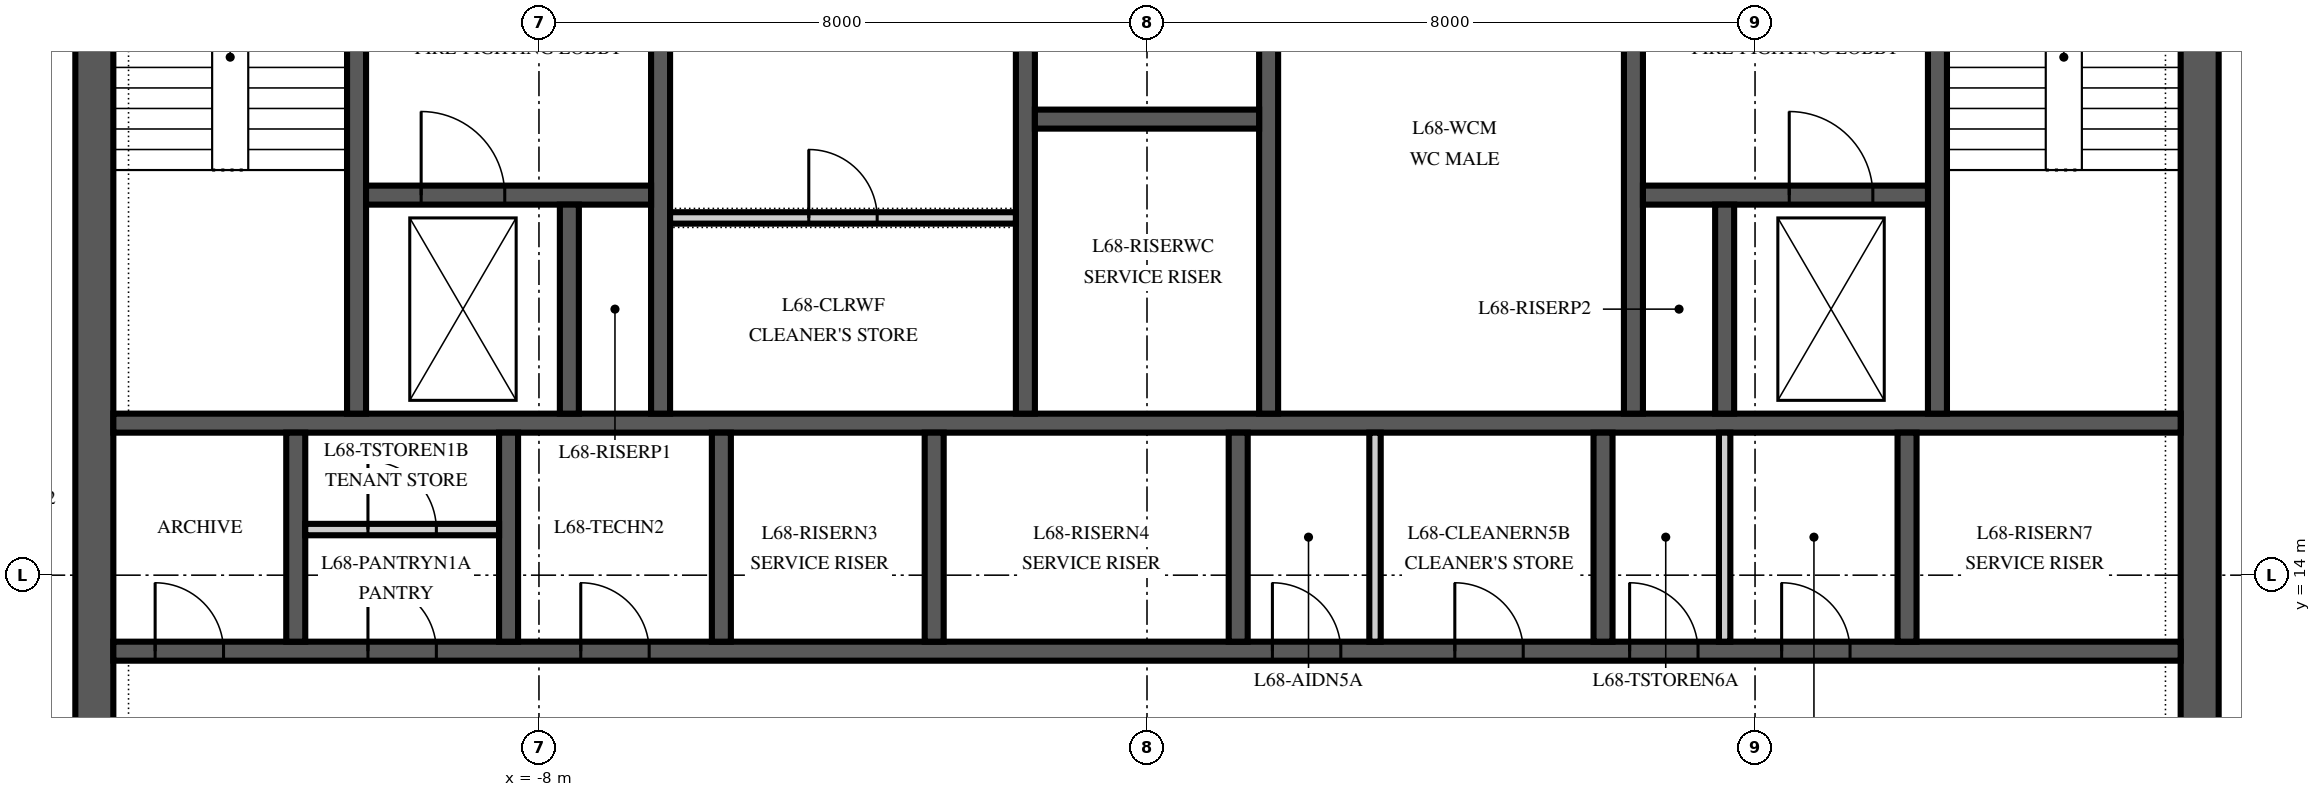
"""IFC4 building model, lengths in metres.
Left out: names, types, materials, properties, quantities, classifications, styles, units other than length and angle.
Written with IfcOpenShell. Run it as: python <this file> out.ifc"""

import sys

from ifc_helpers import new_model, si_unit, direction, frame, frame_2d, origin, place, context, subcontext, project, spatial, polyline, rectangle, outline, extrude, element, fill, save


model = new_model("IFC4")
c1 = context("Model", 3, precision=1e-05, world=origin(), true_north=direction((0.0, 1.0)))
c2 = subcontext(c1, "Body", "Model", "MODEL_VIEW")
j1 = project(units=[si_unit("LENGTHUNIT", "METRE"), si_unit("PLANEANGLEUNIT", "RADIAN")], contexts=[c1])
p1 = place(None, origin())
s1 = spatial("IfcSite", under=j1, at=p1, CompositionType="ELEMENT")
p2 = place(p1, origin())
s2 = spatial("IfcBuilding", under=s1, at=p2, CompositionType="ELEMENT")
p3 = place(p2, frame((0.0, 0.0, 292.0)))
s3 = spatial("IfcBuildingStorey", under=s2, at=p3, CompositionType="ELEMENT", Elevation=292.0)
p4 = place(p3, frame((13.85, 6.15, 0.0), z_axis=(0.0, 0.0, 1.0), x_axis=(0.0, 1.0, 0.0)))
e1 = element("IfcWall", 1, at=p4, inside=s3, PredefinedType="SHEAR", context=c2, shape_type="SweptSolid", body=[
    extrude(outline(polyline([(0.0, -0.25), (17.7, -0.25), (17.7, 0.0), (17.45, 0.0), (17.45, 0.25), (0.25, 0.25), (0.25, 0.0), (0.0, 0.0), (0.0, -0.25)])), origin(), (0.0, 0.0, 1.0), 4.0),
])
p5 = place(p4, frame((4.15, 0.0, 0.0)))
e2 = element("IfcOpeningElement", 2, at=p5, cuts=e1, PredefinedType="OPENING", context=c2, shape_type="SweptSolid", body=[
    extrude(rectangle(XDim=1.8, YDim=2.4, at=frame_2d((0.9, 1.2))), frame((0.0, 0.265, 0.0), z_axis=(0.0, -1.0, 0.0), x_axis=(1.0, 0.0, 0.0)), (0.0, 0.0, 1.0), 0.53),
])
p6 = place(p3, frame((-13.85, 23.85, 0.0), z_axis=(0.0, 0.0, 1.0), x_axis=(0.0, -1.0, 0.0)))
e3 = element("IfcWall", 3, at=p6, inside=s3, PredefinedType="SHEAR", context=c2, shape_type="SweptSolid", body=[
    extrude(outline(polyline([(0.0, -0.25), (17.7, -0.25), (17.7, 0.0), (17.45, 0.0), (17.45, 0.25), (0.25, 0.25), (0.25, 0.0), (0.0, 0.0), (0.0, -0.25)])), origin(), (0.0, 0.0, 1.0), 4.0),
])
p7 = place(p6, frame((11.75, 0.0, 0.0)))
e4 = element("IfcOpeningElement", 4, at=p7, cuts=e3, PredefinedType="OPENING", context=c2, shape_type="SweptSolid", body=[
    extrude(rectangle(XDim=1.8, YDim=2.4, at=frame_2d((0.9, 1.2))), frame((0.0, 0.265, 0.0), z_axis=(0.0, -1.0, 0.0), x_axis=(1.0, 0.0, 0.0)), (0.0, 0.0, 1.0), 0.53),
])
p8 = place(p3, frame((-13.6, 13.0, 0.0), z_axis=(0.0, 0.0, 1.0), x_axis=(1.0, 0.0, 0.0)))
e5 = element("IfcWall", 5, at=p8, inside=s3, PredefinedType="SHEAR", context=c2, shape_type="SweptSolid", body=[
    extrude(rectangle(XDim=27.2, YDim=0.25, at=frame_2d((13.6, 0.0))), origin(), (0.0, 0.0, 1.0), 4.0),
])
p9 = place(p8, frame((15.25, 0.0, 0.0)))
e6 = element("IfcOpeningElement", 6, at=p9, cuts=e5, PredefinedType="OPENING", context=c2, shape_type="SweptSolid", body=[
    extrude(rectangle(XDim=0.9, YDim=2.1, at=frame_2d((0.45, 1.05))), frame((0.0, 0.14, 0.0), z_axis=(0.0, -1.0, 0.0), x_axis=(1.0, 0.0, 0.0)), (0.0, 0.0, 1.0), 0.28),
])
p10 = place(p8, frame((17.65, 0.0, 0.0)))
e7 = element("IfcOpeningElement", 7, at=p10, cuts=e5, PredefinedType="OPENING", context=c2, shape_type="SweptSolid", body=[
    extrude(rectangle(XDim=0.9, YDim=2.1, at=frame_2d((0.45, 1.05))), frame((0.0, 0.14, 0.0), z_axis=(0.0, -1.0, 0.0), x_axis=(1.0, 0.0, 0.0)), (0.0, 0.0, 1.0), 0.28),
])
p11 = place(p8, frame((19.95, 0.0, 0.0)))
e8 = element("IfcOpeningElement", 8, at=p11, cuts=e5, PredefinedType="OPENING", context=c2, shape_type="SweptSolid", body=[
    extrude(rectangle(XDim=0.9, YDim=2.1, at=frame_2d((0.45, 1.05))), frame((0.0, 0.14, 0.0), z_axis=(0.0, -1.0, 0.0), x_axis=(1.0, 0.0, 0.0)), (0.0, 0.0, 1.0), 0.28),
])
p12 = place(p8, frame((21.95, 0.0, 0.0)))
e9 = element("IfcOpeningElement", 9, at=p12, cuts=e5, PredefinedType="OPENING", context=c2, shape_type="SweptSolid", body=[
    extrude(rectangle(XDim=0.9, YDim=2.1, at=frame_2d((0.45, 1.05))), frame((0.0, 0.14, 0.0), z_axis=(0.0, -1.0, 0.0), x_axis=(1.0, 0.0, 0.0)), (0.0, 0.0, 1.0), 0.28),
])
p13 = place(p8, frame((0.55, 0.0, 0.0)))
e10 = element("IfcOpeningElement", 10, at=p13, cuts=e5, PredefinedType="OPENING", context=c2, shape_type="SweptSolid", body=[
    extrude(rectangle(XDim=0.9, YDim=2.1, at=frame_2d((0.45, 1.05))), frame((0.0, 0.14, 0.0), z_axis=(0.0, -1.0, 0.0), x_axis=(1.0, 0.0, 0.0)), (0.0, 0.0, 1.0), 0.28),
])
p14 = place(p8, frame((3.35, 0.0, 0.0)))
e11 = element("IfcOpeningElement", 11, at=p14, cuts=e5, PredefinedType="OPENING", context=c2, shape_type="SweptSolid", body=[
    extrude(rectangle(XDim=0.9, YDim=2.1, at=frame_2d((0.45, 1.05))), frame((0.0, 0.14, 0.0), z_axis=(0.0, -1.0, 0.0), x_axis=(1.0, 0.0, 0.0)), (0.0, 0.0, 1.0), 0.28),
])
p15 = place(p8, frame((6.15, 0.0, 0.0)))
e12 = element("IfcOpeningElement", 12, at=p15, cuts=e5, PredefinedType="OPENING", context=c2, shape_type="SweptSolid", body=[
    extrude(rectangle(XDim=0.9, YDim=2.1, at=frame_2d((0.45, 1.05))), frame((0.0, 0.14, 0.0), z_axis=(0.0, -1.0, 0.0), x_axis=(1.0, 0.0, 0.0)), (0.0, 0.0, 1.0), 0.28),
])
p16 = place(p3, frame((-13.6, 16.0, 0.0), z_axis=(0.0, 0.0, 1.0), x_axis=(1.0, 0.0, 0.0)))
e13 = element("IfcWall", 13, at=p16, inside=s3, PredefinedType="SHEAR", context=c2, shape_type="SweptSolid", body=[
    extrude(rectangle(XDim=27.2, YDim=0.25, at=frame_2d((13.6, 0.0))), origin(), (0.0, 0.0, 1.0), 4.0),
])
for number, where, z_axis, x_axis in (
    (14, (-11.2, 13.125, 0.0), (0.0, 0.0, 1.0), (0.0, 1.0, 0.0)),
    (15, (-8.4, 13.125, 0.0), (0.0, 0.0, 1.0), (0.0, 1.0, 0.0)),
    (16, (-5.6, 13.125, 0.0), (0.0, 0.0, 1.0), (0.0, 1.0, 0.0)),
    (17, (-2.8, 13.125, 0.0), (0.0, 0.0, 1.0), (0.0, 1.0, 0.0)),
    (18, (1.2, 13.125, 0.0), (0.0, 0.0, 1.0), (0.0, 1.0, 0.0)),
    (19, (6.0, 13.125, 0.0), (0.0, 0.0, 1.0), (0.0, 1.0, 0.0)),
    (20, (10.0, 13.125, 0.0), (0.0, 0.0, 1.0), (0.0, 1.0, 0.0)),
):
    element("IfcWall", number, at=place(p3, frame(where, z_axis=z_axis, x_axis=x_axis)), inside=s3, PredefinedType="SHEAR", context=c2, shape_type="SweptSolid", body=[
        extrude(rectangle(XDim=2.75, YDim=0.25, at=frame_2d((1.375, 0.0))), origin(), (0.0, 0.0, 1.0), 4.0),
    ])
p17 = place(p3, frame((-10.4, 16.125, 0.0), z_axis=(0.0, 0.0, 1.0), x_axis=(0.0, 1.0, 0.0)))
e21 = element("IfcWall", 21, at=p17, inside=s3, PredefinedType="SHEAR", context=c2, shape_type="SweptSolid", body=[
    extrude(rectangle(XDim=7.475, YDim=0.25, at=frame_2d((3.738, 0.0))), origin(), (0.0, 0.0, 1.0), 4.0),
])
p18 = place(p17, frame((6.275, 0.0, 0.0)))
e22 = element("IfcOpeningElement", 22, at=p18, cuts=e21, PredefinedType="OPENING", context=c2, shape_type="SweptSolid", body=[
    extrude(rectangle(XDim=1.0, YDim=2.1, at=frame_2d((0.5, 1.05))), frame((0.0, 0.14, 0.0), z_axis=(0.0, -1.0, 0.0), x_axis=(1.0, 0.0, 0.0)), (0.0, 0.0, 1.0), 0.28),
])
for number, where, z_axis, x_axis in (
    (23, (-6.4, 16.125, 0.0), (0.0, 0.0, 1.0), (0.0, 1.0, 0.0)),
    (24, (-1.6, 16.125, 0.0), (0.0, 0.0, 1.0), (0.0, 1.0, 0.0)),
    (25, (1.6, 16.125, 0.0), (0.0, 0.0, 1.0), (0.0, 1.0, 0.0)),
    (26, (6.4, 16.125, 0.0), (0.0, 0.0, 1.0), (0.0, 1.0, 0.0)),
):
    element("IfcWall", number, at=place(p3, frame(where, z_axis=z_axis, x_axis=x_axis)), inside=s3, PredefinedType="SHEAR", context=c2, shape_type="SweptSolid", body=[
        extrude(rectangle(XDim=7.475, YDim=0.25, at=frame_2d((3.738, 0.0))), origin(), (0.0, 0.0, 1.0), 4.0),
    ])
p19 = place(p3, frame((10.4, 16.125, 0.0), z_axis=(0.0, 0.0, 1.0), x_axis=(0.0, 1.0, 0.0)))
e27 = element("IfcWall", 27, at=p19, inside=s3, PredefinedType="SHEAR", context=c2, shape_type="SweptSolid", body=[
    extrude(rectangle(XDim=7.475, YDim=0.25, at=frame_2d((3.738, 0.0))), origin(), (0.0, 0.0, 1.0), 4.0),
])
p20 = place(p19, frame((6.275, 0.0, 0.0)))
e28 = element("IfcOpeningElement", 28, at=p20, cuts=e27, PredefinedType="OPENING", context=c2, shape_type="SweptSolid", body=[
    extrude(rectangle(XDim=1.0, YDim=2.1, at=frame_2d((0.5, 1.05))), frame((0.0, 0.14, 0.0), z_axis=(0.0, -1.0, 0.0), x_axis=(1.0, 0.0, 0.0)), (0.0, 0.0, 1.0), 0.28),
])
p21 = place(p3, frame((-10.275, 19.0, 0.0), z_axis=(0.0, 0.0, 1.0), x_axis=(1.0, 0.0, 0.0)))
e29 = element("IfcWall", 29, at=p21, inside=s3, PredefinedType="SHEAR", context=c2, shape_type="SweptSolid", body=[
    extrude(rectangle(XDim=3.75, YDim=0.25, at=frame_2d((1.875, 0.0))), origin(), (0.0, 0.0, 1.0), 4.0),
])
p22 = place(p21, frame((0.725, 0.0, 0.0)))
e30 = element("IfcOpeningElement", 30, at=p22, cuts=e29, PredefinedType="OPENING", context=c2, shape_type="SweptSolid", body=[
    extrude(rectangle(XDim=1.1, YDim=2.1, at=frame_2d((0.55, 1.05))), frame((0.0, 0.14, 0.0), z_axis=(0.0, -1.0, 0.0), x_axis=(1.0, 0.0, 0.0)), (0.0, 0.0, 1.0), 0.28),
])
p23 = place(p3, frame((6.525, 19.0, 0.0), z_axis=(0.0, 0.0, 1.0), x_axis=(1.0, 0.0, 0.0)))
e31 = element("IfcWall", 31, at=p23, inside=s3, PredefinedType="SHEAR", context=c2, shape_type="SweptSolid", body=[
    extrude(rectangle(XDim=3.75, YDim=0.25, at=frame_2d((1.875, 0.0))), origin(), (0.0, 0.0, 1.0), 4.0),
])
p24 = place(p23, frame((1.925, 0.0, 0.0)))
e32 = element("IfcOpeningElement", 32, at=p24, cuts=e31, PredefinedType="OPENING", context=c2, shape_type="SweptSolid", body=[
    extrude(rectangle(XDim=1.1, YDim=2.1, at=frame_2d((0.55, 1.05))), frame((0.0, 0.14, 0.0), z_axis=(0.0, -1.0, 0.0), x_axis=(1.0, 0.0, 0.0)), (0.0, 0.0, 1.0), 0.28),
])
for number, where, z_axis, x_axis in (
    (33, (-7.6, 16.125, 0.0), (0.0, 0.0, 1.0), (0.0, 1.0, 0.0)),
    (34, (7.6, 16.125, 0.0), (0.0, 0.0, 1.0), (0.0, 1.0, 0.0)),
):
    element("IfcWall", number, at=place(p3, frame(where, z_axis=z_axis, x_axis=x_axis)), inside=s3, PredefinedType="SHEAR", context=c2, shape_type="SweptSolid", body=[
        extrude(rectangle(XDim=2.75, YDim=0.25, at=frame_2d((1.375, 0.0))), origin(), (0.0, 0.0, 1.0), 4.0),
    ])
p25 = place(p3, frame((-1.475, 20.0, 0.0), z_axis=(0.0, 0.0, 1.0), x_axis=(1.0, 0.0, 0.0)))
e35 = element("IfcWall", 35, at=p25, inside=s3, PredefinedType="SHEAR", context=c2, shape_type="SweptSolid", body=[
    extrude(rectangle(XDim=2.95, YDim=0.25, at=frame_2d((1.475, 0.0))), origin(), (0.0, 0.0, 1.0), 4.0),
])
p26 = place(p3, frame((-6.275, 18.7, 0.0), z_axis=(0.0, 0.0, 1.0), x_axis=(1.0, 0.0, 0.0)))
e36 = element("IfcWall", 36, at=p26, inside=s3, PredefinedType="PARTITIONING", context=c2, shape_type="SweptSolid", body=[
    extrude(rectangle(XDim=4.55, YDim=0.15, at=frame_2d((2.275, 0.0))), origin(), (0.0, 0.0, 1.0), 3.85),
])
p27 = place(p26, frame((1.825, 0.0, 0.0)))
e37 = element("IfcOpeningElement", 37, at=p27, cuts=e36, PredefinedType="OPENING", context=c2, shape_type="SweptSolid", body=[
    extrude(rectangle(XDim=0.9, YDim=2.1, at=frame_2d((0.45, 1.05))), frame((0.0, 0.09, 0.0), z_axis=(0.0, -1.0, 0.0), x_axis=(1.0, 0.0, 0.0)), (0.0, 0.0, 1.0), 0.18),
])
for number, where, z_axis, x_axis in (
    (38, (3.0, 13.125, 0.0), (0.0, 0.0, 1.0), (0.0, 1.0, 0.0)),
    (39, (7.6, 13.125, 0.0), (0.0, 0.0, 1.0), (0.0, 1.0, 0.0)),
):
    element("IfcWall", number, at=place(p3, frame(where, z_axis=z_axis, x_axis=x_axis)), inside=s3, PredefinedType="PARTITIONING", context=c2, shape_type="SweptSolid", body=[
        extrude(rectangle(XDim=2.75, YDim=0.15, at=frame_2d((1.375, 0.0))), origin(), (0.0, 0.0, 1.0), 3.85),
    ])
p28 = place(p3, frame((-11.075, 14.6, 0.0), z_axis=(0.0, 0.0, 1.0), x_axis=(1.0, 0.0, 0.0)))
e40 = element("IfcWall", 40, at=p28, inside=s3, PredefinedType="PARTITIONING", context=c2, shape_type="SweptSolid", body=[
    extrude(rectangle(XDim=2.55, YDim=0.15, at=frame_2d((1.275, 0.0))), origin(), (0.0, 0.0, 1.0), 3.85),
])
p29 = place(p28, frame((0.825, 0.0, 0.0)))
e41 = element("IfcOpeningElement", 41, at=p29, cuts=e40, PredefinedType="OPENING", context=c2, shape_type="SweptSolid", body=[
    extrude(rectangle(XDim=0.9, YDim=2.1, at=frame_2d((0.45, 1.05))), frame((0.0, 0.09, 0.0), z_axis=(0.0, -1.0, 0.0), x_axis=(1.0, 0.0, 0.0)), (0.0, 0.0, 1.0), 0.18),
])
p30 = place(p24, origin())
e42 = element("IfcDoor", 42, at=p30, inside=s3, OperationType="SLIDING_TO_RIGHT", PredefinedType="DOOR", context=c2, shape_type="SweptSolid", body=[
    extrude(rectangle(XDim=1.1, YDim=2.1, at=frame_2d((0.55, 1.05))), frame((0.0, 0.125, 0.0), z_axis=(0.0, -1.0, 0.0), x_axis=(1.0, 0.0, 0.0)), (0.0, 0.0, 1.0), 0.25),
])
fill(e32, e42)
p31 = place(p22, origin())
e43 = element("IfcDoor", 43, at=p31, inside=s3, OperationType="SLIDING_TO_RIGHT", PredefinedType="DOOR", context=c2, shape_type="SweptSolid", body=[
    extrude(rectangle(XDim=1.1, YDim=2.1, at=frame_2d((0.55, 1.05))), frame((0.0, 0.125, 0.0), z_axis=(0.0, -1.0, 0.0), x_axis=(1.0, 0.0, 0.0)), (0.0, 0.0, 1.0), 0.25),
])
fill(e30, e43)
p32 = place(p9, origin())
e44 = element("IfcDoor", 44, at=p32, inside=s3, OperationType="SINGLE_SWING_LEFT", PredefinedType="DOOR", context=c2, shape_type="SweptSolid", body=[
    extrude(rectangle(XDim=0.9, YDim=2.1, at=frame_2d((0.45, 1.05))), frame((0.0, 0.125, 0.0), z_axis=(0.0, -1.0, 0.0), x_axis=(1.0, 0.0, 0.0)), (0.0, 0.0, 1.0), 0.25),
])
fill(e6, e44)
p33 = place(p10, origin())
e45 = element("IfcDoor", 45, at=p33, inside=s3, OperationType="SINGLE_SWING_LEFT", PredefinedType="DOOR", context=c2, shape_type="SweptSolid", body=[
    extrude(rectangle(XDim=0.9, YDim=2.1, at=frame_2d((0.45, 1.05))), frame((0.0, 0.125, 0.0), z_axis=(0.0, -1.0, 0.0), x_axis=(1.0, 0.0, 0.0)), (0.0, 0.0, 1.0), 0.25),
])
fill(e7, e45)
p34 = place(p11, origin())
e46 = element("IfcDoor", 46, at=p34, inside=s3, OperationType="SINGLE_SWING_LEFT", PredefinedType="DOOR", context=c2, shape_type="SweptSolid", body=[
    extrude(rectangle(XDim=0.9, YDim=2.1, at=frame_2d((0.45, 1.05))), frame((0.0, 0.125, 0.0), z_axis=(0.0, -1.0, 0.0), x_axis=(1.0, 0.0, 0.0)), (0.0, 0.0, 1.0), 0.25),
])
fill(e8, e46)
p35 = place(p12, origin())
e47 = element("IfcDoor", 47, at=p35, inside=s3, OperationType="SINGLE_SWING_LEFT", PredefinedType="DOOR", context=c2, shape_type="SweptSolid", body=[
    extrude(rectangle(XDim=0.9, YDim=2.1, at=frame_2d((0.45, 1.05))), frame((0.0, 0.125, 0.0), z_axis=(0.0, -1.0, 0.0), x_axis=(1.0, 0.0, 0.0)), (0.0, 0.0, 1.0), 0.25),
])
fill(e9, e47)
p36 = place(p13, origin())
e48 = element("IfcDoor", 48, at=p36, inside=s3, OperationType="SINGLE_SWING_LEFT", PredefinedType="DOOR", context=c2, shape_type="SweptSolid", body=[
    extrude(rectangle(XDim=0.9, YDim=2.1, at=frame_2d((0.45, 1.05))), frame((0.0, 0.125, 0.0), z_axis=(0.0, -1.0, 0.0), x_axis=(1.0, 0.0, 0.0)), (0.0, 0.0, 1.0), 0.25),
])
fill(e10, e48)
p37 = place(p14, origin())
e49 = element("IfcDoor", 49, at=p37, inside=s3, OperationType="SINGLE_SWING_LEFT", PredefinedType="DOOR", context=c2, shape_type="SweptSolid", body=[
    extrude(rectangle(XDim=0.9, YDim=2.1, at=frame_2d((0.45, 1.05))), frame((0.0, 0.125, 0.0), z_axis=(0.0, -1.0, 0.0), x_axis=(1.0, 0.0, 0.0)), (0.0, 0.0, 1.0), 0.25),
])
fill(e11, e49)
p38 = place(p29, origin())
e50 = element("IfcDoor", 50, at=p38, inside=s3, OperationType="SINGLE_SWING_LEFT", PredefinedType="DOOR", context=c2, shape_type="SweptSolid", body=[
    extrude(rectangle(XDim=0.9, YDim=2.1, at=frame_2d((0.45, 1.05))), frame((0.0, 0.075, 0.0), z_axis=(0.0, -1.0, 0.0), x_axis=(1.0, 0.0, 0.0)), (0.0, 0.0, 1.0), 0.149),
])
fill(e41, e50)
p39 = place(p15, origin())
e51 = element("IfcDoor", 51, at=p39, inside=s3, OperationType="SINGLE_SWING_LEFT", PredefinedType="DOOR", context=c2, shape_type="SweptSolid", body=[
    extrude(rectangle(XDim=0.9, YDim=2.1, at=frame_2d((0.45, 1.05))), frame((0.0, 0.125, 0.0), z_axis=(0.0, -1.0, 0.0), x_axis=(1.0, 0.0, 0.0)), (0.0, 0.0, 1.0), 0.25),
])
fill(e12, e51)
p40 = place(p27, origin())
e52 = element("IfcDoor", 52, at=p40, inside=s3, OperationType="SINGLE_SWING_LEFT", PredefinedType="DOOR", context=c2, shape_type="SweptSolid", body=[
    extrude(rectangle(XDim=0.9, YDim=2.1, at=frame_2d((0.45, 1.05))), frame((0.0, 0.075, 0.0), z_axis=(0.0, -1.0, 0.0), x_axis=(1.0, 0.0, 0.0)), (0.0, 0.0, 1.0), 0.149),
])
fill(e37, e52)
save(model, sys.argv[1])
